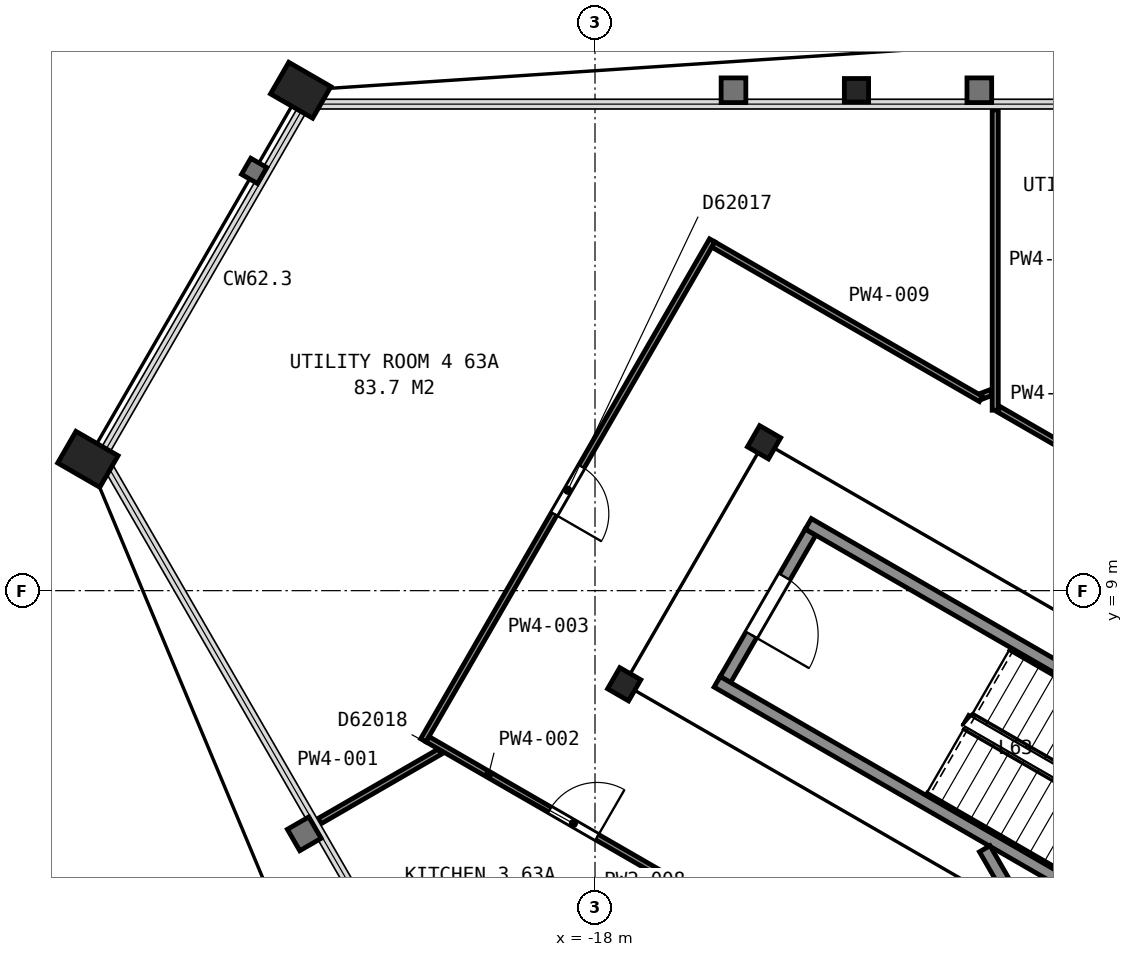
"""IFC4 building model, lengths in metres.
Left out: names, types, materials, properties, quantities, classifications, styles, units other than length and angle.
Written with IfcOpenShell. Run it as: python <this file> out.ifc"""

import sys

from ifc_helpers import new_model, si_unit, direction, frame, frame_2d, origin, origin_2d, place, context, subcontext, project, spatial, rectangle, hollow_rectangle, i_section, extrude, element, fill, save


model = new_model("IFC4")
c1 = context("Model", 3, precision=1e-05, world=origin(), true_north=direction((0.0, 1.0)))
c2 = subcontext(c1, "Body", "Model", "MODEL_VIEW")
j1 = project(units=[si_unit("LENGTHUNIT", "METRE"), si_unit("PLANEANGLEUNIT", "RADIAN")], contexts=[c1])
p1 = place(None, origin())
s1 = spatial("IfcSite", under=j1, at=p1, CompositionType="ELEMENT")
p2 = place(p1, origin())
s2 = spatial("IfcBuilding", under=s1, at=p2, CompositionType="ELEMENT")
p3 = place(p2, frame((0.0, 0.0, 250.8)))
s3 = spatial("IfcBuildingStorey", under=s2, at=p3, CompositionType="ELEMENT", Elevation=250.8)
p4 = place(p3, frame((-13.7, 17.23, 0.0), z_axis=(0.0, 0.0, 1.0), x_axis=(1.0, 0.0, 0.0)))
e1 = element("IfcColumn", 1, at=p4, inside=s3, PredefinedType="COLUMN", context=c2, shape_type="SweptSolid", body=[
    extrude(i_section(OverallWidth=0.399, OverallDepth=0.386, WebThickness=0.021, FlangeThickness=0.033, FilletRadius=0.015, at=origin_2d()), origin(), (0.0, 0.0, 1.0), 3.7),
])
for number, where, z_axis, x_axis in (
    (2, (-22.84, 17.23, 0.0), (0.0, 0.0, 1.0), (0.5, 0.866, 0.0)),
    (3, (-26.34, 11.16, 0.0), (0.0, 0.0, 1.0), (0.5, 0.866, 0.0)),
):
    element("IfcColumn", number, at=place(p3, frame(where, z_axis=z_axis, x_axis=x_axis)), inside=s3, PredefinedType="COLUMN", context=c2, shape_type="SweptSolid", body=[
        extrude(hollow_rectangle(XDim=0.6, YDim=0.8, WallThickness=0.05, at=origin_2d()), origin(), (0.0, 0.0, 1.0), 3.7),
    ])
for number, where, z_axis, x_axis in (
    (4, (-15.22, 11.44, 0.0), (0.0, 0.0, 1.0), (0.5, 0.866, 0.0)),
    (5, (-17.52, 7.46, 0.0), (0.0, 0.0, 1.0), (0.5, 0.866, 0.0)),
):
    element("IfcColumn", number, at=place(p3, frame(where, z_axis=z_axis, x_axis=x_axis)), inside=s3, PredefinedType="COLUMN", context=c2, shape_type="SweptSolid", body=[
        extrude(i_section(OverallWidth=0.401, OverallDepth=0.399, WebThickness=0.025, FlangeThickness=0.04, FilletRadius=0.015, at=origin_2d()), origin(), (0.0, 0.0, 1.0), 3.7),
    ])
p5 = place(p3, frame((-14.455, 9.962, 0.0), z_axis=(0.0, 0.0, 1.0), x_axis=(-0.500049511043, -0.865996816683, 0.0)))
e6 = element("IfcWall", 6, at=p5, inside=s3, PredefinedType="PARTITIONING", context=c2, shape_type="SweptSolid", body=[
    extrude(rectangle(XDim=2.8, YDim=0.2, at=frame_2d((1.4, 0.0))), origin(), (0.0, 0.0, 1.0), 3.45),
])
p6 = place(p5, frame((0.85, 0.0, 0.0)))
e7 = element("IfcOpeningElement", 7, at=p6, cuts=e6, PredefinedType="OPENING", context=c2, shape_type="SweptSolid", body=[
    extrude(rectangle(XDim=1.1, YDim=2.1, at=frame_2d((0.55, 1.05))), frame((0.0, 0.11, 0.0), z_axis=(0.0, -1.0, 0.0), x_axis=(1.0, 0.0, 0.0)), (0.0, 0.0, 1.0), 0.22),
])
for number, where, z_axis, x_axis in (
    (8, (-7.678, 2.701, 0.0), (0.0, 0.0, 1.0), (-0.866, 0.5, 0.0)),
    (9, (-6.178, 5.299, 0.0), (0.0, 0.0, 1.0), (-0.866, 0.5, 0.0)),
):
    element("IfcWall", number, at=place(p3, frame(where, z_axis=z_axis, x_axis=x_axis)), inside=s3, PredefinedType="PARTITIONING", context=c2, shape_type="SweptSolid", body=[
        extrude(rectangle(XDim=9.6, YDim=0.2, at=frame_2d((4.8, 0.0))), origin(), (0.0, 0.0, 1.0), 3.45),
    ])
p7 = place(p3, frame((-11.591, 4.755, 0.0), z_axis=(0.0, 0.0, 1.0), x_axis=(0.500043977787, -0.866000011708, 0.0)))
e10 = element("IfcWall", 10, at=p7, inside=s3, PredefinedType="PARTITIONING", context=c2, shape_type="SweptSolid", body=[
    extrude(rectangle(XDim=6.617, YDim=0.2, at=frame_2d((3.308, 0.0))), origin(), (0.0, 0.0, 1.0), 3.45),
])
p8 = place(p7, frame((3.695, 0.0, 0.0)))
e11 = element("IfcOpeningElement", 11, at=p8, cuts=e10, PredefinedType="OPENING", context=c2, shape_type="SweptSolid", body=[
    extrude(rectangle(XDim=1.8, YDim=2.1, at=frame_2d((0.9, 1.05))), frame((0.0, 0.11, 0.0), z_axis=(0.0, -1.0, 0.0), x_axis=(1.0, 0.0, 0.0)), (0.0, 0.0, 1.0), 0.22),
])
p9 = place(p3, frame((-22.53, 5.21, 0.0), z_axis=(0.0, 0.0, 1.0), x_axis=(0.865865073245, 0.500277597875, 0.0)))
e12 = element("IfcWall", 12, at=p9, inside=s3, PredefinedType="PARTITIONING", context=c2, shape_type="SweptSolid", body=[
    extrude(rectangle(XDim=2.284, YDim=0.1, at=frame_2d((1.142, 0.0))), origin(), (0.0, 0.0, 1.0), 2.713),
])
p10 = place(p3, frame((-16.253, 3.957, 0.0), z_axis=(0.0, 0.0, 1.0), x_axis=(-0.866006514596, 0.500032715607, 0.0)))
e13 = element("IfcWall", 13, at=p10, inside=s3, PredefinedType="PARTITIONING", context=c2, shape_type="SweptSolid", body=[
    extrude(rectangle(XDim=5.199, YDim=0.1, at=frame_2d((2.6, 0.0))), origin(), (0.0, 0.0, 1.0), 2.713),
])
p11 = place(p10, frame((1.978, 0.0, 0.0)))
e14 = element("IfcOpeningElement", 14, at=p11, cuts=e13, PredefinedType="OPENING", context=c2, shape_type="SweptSolid", body=[
    extrude(rectangle(XDim=0.9, YDim=2.1, at=frame_2d((0.45, 1.05))), frame((0.0, 0.06, 0.0), z_axis=(0.0, -1.0, 0.0), x_axis=(1.0, 0.0, 0.0)), (0.0, 0.0, 1.0), 0.12),
])
p12 = place(p3, frame((-20.824, 6.539, 0.0), z_axis=(0.0, 0.0, 1.0), x_axis=(0.500297300687, 0.865853689098, 0.0)))
e15 = element("IfcWall", 15, at=p12, inside=s3, PredefinedType="PARTITIONING", context=c2, shape_type="SweptSolid", body=[
    extrude(rectangle(XDim=9.496, YDim=0.1, at=frame_2d((4.748, 0.0))), origin(), (0.0, 0.0, 1.0), 2.713),
])
p13 = place(p12, frame((4.3, 0.0, 0.0)))
e16 = element("IfcOpeningElement", 16, at=p13, cuts=e15, PredefinedType="OPENING", context=c2, shape_type="SweptSolid", body=[
    extrude(rectangle(XDim=0.9, YDim=2.1, at=frame_2d((0.45, 1.05))), frame((0.0, 0.06, 0.0), z_axis=(0.0, -1.0, 0.0), x_axis=(1.0, 0.0, 0.0)), (0.0, 0.0, 1.0), 0.12),
])
p14 = place(p3, frame((-16.055, 14.693, 0.0), z_axis=(0.0, 0.0, 1.0), x_axis=(0.866094383736, -0.499880504182, 0.0)))
e17 = element("IfcWall", 17, at=p14, inside=s3, PredefinedType="PARTITIONING", context=c2, shape_type="SweptSolid", body=[
    extrude(rectangle(XDim=5.081, YDim=0.1, at=frame_2d((2.541, 0.0))), origin(), (0.0, 0.0, 1.0), 2.713),
])
p15 = place(p3, frame((-11.632, 12.203, 0.0), z_axis=(0.0, 0.0, 1.0), x_axis=(0.934710776834, 0.355409290354, 0.0)))
e18 = element("IfcWall", 18, at=p15, inside=s3, PredefinedType="PARTITIONING", context=c2, shape_type="SweptSolid", body=[
    extrude(rectangle(XDim=0.156, YDim=0.1, at=frame_2d((0.078, 0.0))), origin(), (0.0, 0.0, 1.0), 2.713),
])
p16 = place(p3, frame((-11.418, 11.967, 0.0), z_axis=(0.0, 0.0, 1.0), x_axis=(0.0, 1.0, 0.0)))
e19 = element("IfcWall", 19, at=p16, inside=s3, PredefinedType="PARTITIONING", context=c2, shape_type="SweptSolid", body=[
    extrude(rectangle(XDim=4.939, YDim=0.1, at=frame_2d((2.469, 0.0))), origin(), (0.0, 0.0, 1.0), 2.713),
])
p17 = place(p3, frame((-11.357, 11.982, 0.0), z_axis=(0.0, 0.0, 1.0), x_axis=(0.866039032844, -0.499976393034, 0.0)))
e20 = element("IfcWall", 20, at=p17, inside=s3, PredefinedType="PARTITIONING", context=c2, shape_type="SweptSolid", body=[
    extrude(rectangle(XDim=3.079, YDim=0.1, at=frame_2d((1.54, 0.0))), origin(), (0.0, 0.0, 1.0), 2.713),
])
p18 = place(p17, frame((1.08, 0.0, 0.0)))
e21 = element("IfcOpeningElement", 21, at=p18, cuts=e20, PredefinedType="OPENING", context=c2, shape_type="SweptSolid", body=[
    extrude(rectangle(XDim=0.9, YDim=2.1, at=frame_2d((0.45, 1.05))), frame((0.0, 0.06, 0.0), z_axis=(0.0, -1.0, 0.0), x_axis=(1.0, 0.0, 0.0)), (0.0, 0.0, 1.0), 0.12),
])
p19 = place(p6, origin())
e22 = element("IfcDoor", 22, at=p19, inside=s3, OperationType="SINGLE_SWING_RIGHT", PredefinedType="DOOR", context=c2, shape_type="SweptSolid", body=[
    extrude(rectangle(XDim=1.1, YDim=2.1, at=frame_2d((0.55, 1.05))), frame((0.0, 0.025, 0.0), z_axis=(0.0, -1.0, 0.0), x_axis=(1.0, 0.0, 0.0)), (0.0, 0.0, 1.0), 0.05),
])
fill(e7, e22)
p20 = place(p11, origin())
e23 = element("IfcDoor", 23, at=p20, inside=s3, OperationType="SINGLE_SWING_LEFT", PredefinedType="DOOR", context=c2, shape_type="SweptSolid", body=[
    extrude(rectangle(XDim=0.9, YDim=2.1, at=frame_2d((0.45, 1.05))), frame((0.0, 0.025, 0.0), z_axis=(0.0, -1.0, 0.0), x_axis=(1.0, 0.0, 0.0)), (0.0, 0.0, 1.0), 0.05),
])
fill(e14, e23)
p21 = place(p13, origin())
e24 = element("IfcDoor", 24, at=p21, inside=s3, OperationType="SINGLE_SWING_LEFT", PredefinedType="DOOR", context=c2, shape_type="SweptSolid", body=[
    extrude(rectangle(XDim=0.9, YDim=2.1, at=frame_2d((0.45, 1.05))), frame((0.0, 0.025, 0.0), z_axis=(0.0, -1.0, 0.0), x_axis=(1.0, 0.0, 0.0)), (0.0, 0.0, 1.0), 0.05),
])
fill(e16, e24)
save(model, sys.argv[1])
